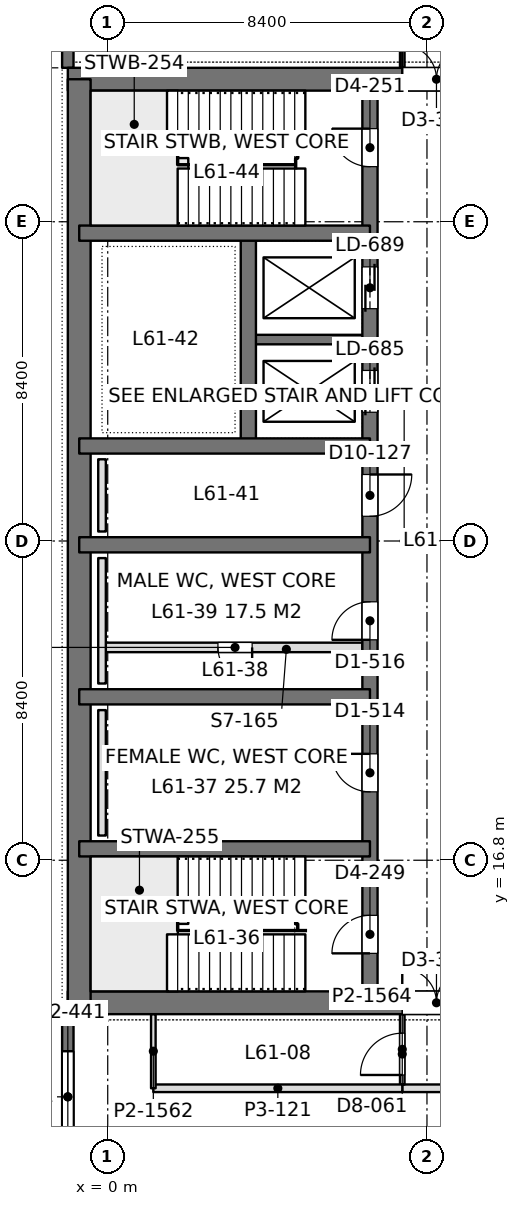
"""IFC4 building model, lengths in metres.
Left out: names, types, materials, properties, quantities, classifications, styles, units other than length and angle.
Written with IfcOpenShell. Run it as: python <this file> out.ifc"""

import sys

from ifc_helpers import new_model, si_unit, direction, frame, frame_2d, origin, place, context, subcontext, project, spatial, rectangle, extrude, element, fill, save


model = new_model("IFC4")
c1 = context("Model", 3, precision=1e-05, world=origin(), true_north=direction((0.0, 1.0)))
c2 = subcontext(c1, "Body", "Model", "MODEL_VIEW")
j1 = project(units=[si_unit("LENGTHUNIT", "METRE"), si_unit("PLANEANGLEUNIT", "RADIAN")], contexts=[c1])
p1 = place(None, origin())
s1 = spatial("IfcSite", under=j1, at=p1, CompositionType="ELEMENT")
p2 = place(p1, origin())
s2 = spatial("IfcBuilding", under=s1, at=p2, CompositionType="ELEMENT")
p3 = place(p2, frame((0.0, 0.0, 268.2)))
s3 = spatial("IfcBuildingStorey", under=s2, at=p3, CompositionType="ELEMENT", Elevation=268.2)
p4 = place(p3, frame((-1.05, 13.05, 0.0), z_axis=(0.0, 0.0, 1.0), x_axis=(1.0, 0.0, 0.0)))
e1 = element("IfcWall", 1, at=p4, inside=s3, PredefinedType="SHEAR", context=c2, shape_type="SweptSolid", body=[
    extrude(rectangle(XDim=17.7, YDim=0.6, at=frame_2d((8.85, 0.0))), origin(), (0.0, 0.0, 1.0), 4.5),
])
p5 = place(p4, frame((8.8, 0.0, 0.0)))
e2 = element("IfcOpeningElement", 2, at=p5, cuts=e1, PredefinedType="OPENING", context=c2, shape_type="SweptSolid", body=[
    extrude(rectangle(XDim=1.8, YDim=2.4, at=frame_2d((0.9, 1.2))), frame((0.0, 0.31, 0.0), z_axis=(0.0, -1.0, 0.0), x_axis=(1.0, 0.0, 0.0)), (0.0, 0.0, 1.0), 0.62),
])
p6 = place(p3, frame((-1.05, 37.35, 0.0), z_axis=(0.0, 0.0, 1.0), x_axis=(1.0, 0.0, 0.0)))
e3 = element("IfcWall", 3, at=p6, inside=s3, PredefinedType="SHEAR", context=c2, shape_type="SweptSolid", body=[
    extrude(rectangle(XDim=17.7, YDim=0.6, at=frame_2d((8.85, 0.0))), origin(), (0.0, 0.0, 1.0), 4.5),
])
p7 = place(p6, frame((8.8, 0.0, 0.0)))
e4 = element("IfcOpeningElement", 4, at=p7, cuts=e3, PredefinedType="OPENING", context=c2, shape_type="SweptSolid", body=[
    extrude(rectangle(XDim=1.8, YDim=2.4, at=frame_2d((0.9, 1.2))), frame((0.0, 0.31, 0.0), z_axis=(0.0, -1.0, 0.0), x_axis=(1.0, 0.0, 0.0)), (0.0, 0.0, 1.0), 0.62),
])
p8 = place(p3, frame((-0.75, 13.05, 0.0), z_axis=(0.0, 0.0, 1.0), x_axis=(0.0, 1.0, 0.0)))
e5 = element("IfcWall", 5, at=p8, inside=s3, PredefinedType="SHEAR", context=c2, shape_type="SweptSolid", body=[
    extrude(rectangle(XDim=24.3, YDim=0.6, at=frame_2d((12.15, 0.0))), origin(), (0.0, 0.0, 1.0), 4.5),
])
p9 = place(p3, frame((6.9, 13.05, 0.0), z_axis=(0.0, 0.0, 1.0), x_axis=(0.0, 1.0, 0.0)))
e6 = element("IfcWall", 6, at=p9, inside=s3, PredefinedType="SHEAR", context=c2, shape_type="SweptSolid", body=[
    extrude(rectangle(XDim=24.3, YDim=0.4, at=frame_2d((12.15, 0.0))), origin(), (0.0, 0.0, 1.0), 4.5),
])
p10 = place(p9, frame((1.3, 0.0, 0.0)))
e7 = element("IfcOpeningElement", 7, at=p10, cuts=e6, PredefinedType="OPENING", context=c2, shape_type="SweptSolid", body=[
    extrude(rectangle(XDim=1.0, YDim=2.2, at=frame_2d((0.5, 1.1))), frame((0.0, 0.21, 0.0), z_axis=(0.0, -1.0, 0.0), x_axis=(1.0, 0.0, 0.0)), (0.0, 0.0, 1.0), 0.42),
])
p11 = place(p9, frame((22.0, 0.0, 0.0)))
e8 = element("IfcOpeningElement", 8, at=p11, cuts=e6, PredefinedType="OPENING", context=c2, shape_type="SweptSolid", body=[
    extrude(rectangle(XDim=1.0, YDim=2.2, at=frame_2d((0.5, 1.1))), frame((0.0, 0.21, 0.0), z_axis=(0.0, -1.0, 0.0), x_axis=(1.0, 0.0, 0.0)), (0.0, 0.0, 1.0), 0.42),
])
p12 = place(p9, frame((5.55, 0.0, 0.0)))
e9 = element("IfcOpeningElement", 9, at=p12, cuts=e6, PredefinedType="OPENING", context=c2, shape_type="SweptSolid", body=[
    extrude(rectangle(XDim=1.0, YDim=2.2, at=frame_2d((0.5, 1.1))), frame((0.0, 0.21, 0.0), z_axis=(0.0, -1.0, 0.0), x_axis=(1.0, 0.0, 0.0)), (0.0, 0.0, 1.0), 0.42),
])
p13 = place(p9, frame((9.55, 0.0, 0.0)))
e10 = element("IfcOpeningElement", 10, at=p13, cuts=e6, PredefinedType="OPENING", context=c2, shape_type="SweptSolid", body=[
    extrude(rectangle(XDim=1.0, YDim=2.2, at=frame_2d((0.5, 1.1))), frame((0.0, 0.21, 0.0), z_axis=(0.0, -1.0, 0.0), x_axis=(1.0, 0.0, 0.0)), (0.0, 0.0, 1.0), 0.42),
])
p14 = place(p9, frame((12.8, 0.0, 0.0)))
e11 = element("IfcOpeningElement", 11, at=p14, cuts=e6, PredefinedType="OPENING", context=c2, shape_type="SweptSolid", body=[
    extrude(rectangle(XDim=1.1, YDim=2.2, at=frame_2d((0.55, 1.1))), frame((0.0, 0.21, 0.0), z_axis=(0.0, -1.0, 0.0), x_axis=(1.0, 0.0, 0.0)), (0.0, 0.0, 1.0), 0.42),
])
p15 = place(p9, frame((15.538, 0.0, 0.0)))
e12 = element("IfcOpeningElement", 12, at=p15, cuts=e6, PredefinedType="OPENING", context=c2, shape_type="SweptSolid", body=[
    extrude(rectangle(XDim=1.1, YDim=2.2, at=frame_2d((0.55, 1.1))), frame((0.0, 0.21, 0.0), z_axis=(0.0, -1.0, 0.0), x_axis=(1.0, 0.0, 0.0)), (0.0, 0.0, 1.0), 0.42),
])
p16 = place(p9, frame((18.262, 0.0, 0.0)))
e13 = element("IfcOpeningElement", 13, at=p16, cuts=e6, PredefinedType="OPENING", context=c2, shape_type="SweptSolid", body=[
    extrude(rectangle(XDim=1.1, YDim=2.2, at=frame_2d((0.55, 1.1))), frame((0.0, 0.21, 0.0), z_axis=(0.0, -1.0, 0.0), x_axis=(1.0, 0.0, 0.0)), (0.0, 0.0, 1.0), 0.42),
])
for number, where, z_axis, x_axis in (
    (14, (-0.75, 17.1, 0.0), (0.0, 0.0, 1.0), (1.0, 0.0, 0.0)),
    (15, (-0.75, 21.1, 0.0), (0.0, 0.0, 1.0), (1.0, 0.0, 0.0)),
    (16, (-0.75, 25.1, 0.0), (0.0, 0.0, 1.0), (1.0, 0.0, 0.0)),
    (17, (-0.75, 27.7, 0.0), (0.0, 0.0, 1.0), (1.0, 0.0, 0.0)),
    (18, (-0.75, 33.3, 0.0), (0.0, 0.0, 1.0), (1.0, 0.0, 0.0)),
):
    element("IfcWall", number, at=place(p3, frame(where, z_axis=z_axis, x_axis=x_axis)), inside=s3, PredefinedType="SHEAR", context=c2, shape_type="SweptSolid", body=[
        extrude(rectangle(XDim=7.65, YDim=0.4, at=frame_2d((3.825, 0.0))), origin(), (0.0, 0.0, 1.0), 4.5),
    ])
p17 = place(p3, frame((3.7, 27.7, 0.0), z_axis=(0.0, 0.0, 1.0), x_axis=(0.0, 1.0, 0.0)))
e19 = element("IfcWall", 19, at=p17, inside=s3, PredefinedType="SHEAR", context=c2, shape_type="SweptSolid", body=[
    extrude(rectangle(XDim=5.6, YDim=0.4, at=frame_2d((2.8, 0.0))), origin(), (0.0, 0.0, 1.0), 4.5),
])
p18 = place(p3, frame((3.7, 30.5, 0.0), z_axis=(0.0, 0.0, 1.0), x_axis=(1.0, 0.0, 0.0)))
e20 = element("IfcWall", 20, at=p18, inside=s3, PredefinedType="SHEAR", context=c2, shape_type="SweptSolid", body=[
    extrude(rectangle(XDim=3.2, YDim=0.25, at=frame_2d((1.6, 0.0))), origin(), (0.0, 0.0, 1.0), 4.5),
])
p19 = place(p3, frame((-1.05, 8.4, 0.0), z_axis=(0.0, 0.0, 1.0), x_axis=(0.0, 1.0, 0.0)))
e21 = element("IfcWall", 21, at=p19, inside=s3, PredefinedType="SOLIDWALL", context=c2, shape_type="SweptSolid", body=[
    extrude(rectangle(XDim=4.35, YDim=0.3, at=frame_2d((2.175, 0.0))), origin(), (0.0, 0.0, 1.0), 4.35),
])
p20 = place(p19, frame((0.975, 0.0, 0.9)))
e22 = element("IfcOpeningElement", 22, at=p20, cuts=e21, PredefinedType="OPENING", context=c2, shape_type="SweptSolid", body=[
    extrude(rectangle(XDim=2.4, YDim=1.9, at=frame_2d((1.2, 0.95))), frame((0.0, 0.16, 0.0), z_axis=(0.0, -1.0, 0.0), x_axis=(1.0, 0.0, 0.0)), (0.0, 0.0, 1.0), 0.32),
])
p21 = place(p3, frame((-1.05, 37.65, 0.0), z_axis=(0.0, 0.0, 1.0), x_axis=(0.0, 1.0, 0.0)))
e23 = element("IfcWall", 23, at=p21, inside=s3, PredefinedType="SOLIDWALL", context=c2, shape_type="SweptSolid", body=[
    extrude(rectangle(XDim=4.35, YDim=0.3, at=frame_2d((2.175, 0.0))), origin(), (0.0, 0.0, 1.0), 4.35),
])
p22 = place(p21, frame((0.975, 0.0, 0.9)))
e24 = element("IfcOpeningElement", 24, at=p22, cuts=e23, PredefinedType="OPENING", context=c2, shape_type="SweptSolid", body=[
    extrude(rectangle(XDim=2.4, YDim=1.9, at=frame_2d((1.2, 0.95))), frame((0.0, 0.16, 0.0), z_axis=(0.0, -1.0, 0.0), x_axis=(1.0, 0.0, 0.0)), (0.0, 0.0, 1.0), 0.32),
])
p23 = place(p3, frame((7.748, 10.8, 0.0), z_axis=(0.0, 0.0, 1.0), x_axis=(1.0, 0.0, 0.0)))
e25 = element("IfcWall", 25, at=p23, inside=s3, PredefinedType="PARTITIONING", context=c2, shape_type="SweptSolid", body=[
    extrude(rectangle(XDim=41.452, YDim=0.2, at=frame_2d((20.726, 0.0))), origin(), (0.0, 0.0, 1.0), 3.8),
])
p24 = place(p23, frame((1.527, 0.0, 0.0)))
e26 = element("IfcOpeningElement", 26, at=p24, cuts=e25, PredefinedType="OPENING", context=c2, shape_type="SweptSolid", body=[
    extrude(rectangle(XDim=1.8, YDim=2.2, at=frame_2d((0.9, 1.1))), frame((0.0, 0.11, 0.0), z_axis=(0.0, -1.0, 0.0), x_axis=(1.0, 0.0, 0.0)), (0.0, 0.0, 1.0), 0.22),
])
p25 = place(p23, frame((8.152, 0.0, 0.0)))
e27 = element("IfcOpeningElement", 27, at=p25, cuts=e25, PredefinedType="OPENING", context=c2, shape_type="SweptSolid", body=[
    extrude(rectangle(XDim=1.8, YDim=2.2, at=frame_2d((0.9, 1.1))), frame((0.0, 0.11, 0.0), z_axis=(0.0, -1.0, 0.0), x_axis=(1.0, 0.0, 0.0)), (0.0, 0.0, 1.0), 0.22),
])
p26 = place(p23, frame((12.352, 0.0, 0.0)))
e28 = element("IfcOpeningElement", 28, at=p26, cuts=e25, PredefinedType="OPENING", context=c2, shape_type="SweptSolid", body=[
    extrude(rectangle(XDim=1.8, YDim=2.2, at=frame_2d((0.9, 1.1))), frame((0.0, 0.11, 0.0), z_axis=(0.0, -1.0, 0.0), x_axis=(1.0, 0.0, 0.0)), (0.0, 0.0, 1.0), 0.22),
])
p27 = place(p23, frame((20.752, 0.0, 0.0)))
e29 = element("IfcOpeningElement", 29, at=p27, cuts=e25, PredefinedType="OPENING", context=c2, shape_type="SweptSolid", body=[
    extrude(rectangle(XDim=1.8, YDim=2.2, at=frame_2d((0.9, 1.1))), frame((0.0, 0.11, 0.0), z_axis=(0.0, -1.0, 0.0), x_axis=(1.0, 0.0, 0.0)), (0.0, 0.0, 1.0), 0.22),
])
p28 = place(p23, frame((24.952, 0.0, 0.0)))
e30 = element("IfcOpeningElement", 30, at=p28, cuts=e25, PredefinedType="OPENING", context=c2, shape_type="SweptSolid", body=[
    extrude(rectangle(XDim=1.8, YDim=2.2, at=frame_2d((0.9, 1.1))), frame((0.0, 0.11, 0.0), z_axis=(0.0, -1.0, 0.0), x_axis=(1.0, 0.0, 0.0)), (0.0, 0.0, 1.0), 0.22),
])
p29 = place(p23, frame((32.952, 0.0, 0.0)))
e31 = element("IfcOpeningElement", 31, at=p29, cuts=e25, PredefinedType="OPENING", context=c2, shape_type="SweptSolid", body=[
    extrude(rectangle(XDim=1.8, YDim=2.2, at=frame_2d((0.9, 1.1))), frame((0.0, 0.11, 0.0), z_axis=(0.0, -1.0, 0.0), x_axis=(1.0, 0.0, 0.0)), (0.0, 0.0, 1.0), 0.22),
])
p30 = place(p23, frame((36.752, 0.0, 0.0)))
e32 = element("IfcOpeningElement", 32, at=p30, cuts=e25, PredefinedType="OPENING", context=c2, shape_type="SweptSolid", body=[
    extrude(rectangle(XDim=1.8, YDim=2.2, at=frame_2d((0.9, 1.1))), frame((0.0, 0.11, 0.0), z_axis=(0.0, -1.0, 0.0), x_axis=(1.0, 0.0, 0.0)), (0.0, 0.0, 1.0), 0.22),
])
p31 = place(p3, frame((7.75, 10.898, 0.0), z_axis=(0.0, 0.0, 1.0), x_axis=(0.0, 1.0, 0.0)))
e33 = element("IfcWall", 33, at=p31, inside=s3, PredefinedType="PARTITIONING", context=c2, shape_type="SweptSolid", body=[
    extrude(rectangle(XDim=1.854, YDim=0.12, at=frame_2d((0.927, 0.0))), origin(), (0.0, 0.0, 1.0), 4.35),
])
p32 = place(p31, frame((0.252, 0.0, 0.0)))
e34 = element("IfcOpeningElement", 34, at=p32, cuts=e33, PredefinedType="OPENING", context=c2, shape_type="SweptSolid", body=[
    extrude(rectangle(XDim=1.1, YDim=2.4, at=frame_2d((0.55, 1.2))), frame((0.0, 0.07, 0.0), z_axis=(0.0, -1.0, 0.0), x_axis=(1.0, 0.0, 0.0)), (0.0, 0.0, 1.0), 0.14),
])
p33 = place(p3, frame((1.2, 10.8, 0.0), z_axis=(0.0, 0.0, 1.0), x_axis=(1.0, 0.0, 0.0)))
e35 = element("IfcWall", 35, at=p33, inside=s3, PredefinedType="PARTITIONING", context=c2, shape_type="SweptSolid", body=[
    extrude(rectangle(XDim=6.552, YDim=0.2, at=frame_2d((3.276, 0.0))), origin(), (0.0, 0.0, 1.0), 4.35),
])
p34 = place(p3, frame((1.2, 10.8, 0.0), z_axis=(0.0, 0.0, 1.0), x_axis=(0.0, 1.0, 0.0)))
e36 = element("IfcWall", 36, at=p34, inside=s3, PredefinedType="PARTITIONING", context=c2, shape_type="SweptSolid", body=[
    extrude(rectangle(XDim=1.952, YDim=0.12, at=frame_2d((0.976, 0.0))), origin(), (0.0, 0.0, 1.0), 4.35),
])
p35 = place(p3, frame((7.75, 37.648, 0.0), z_axis=(0.0, 0.0, 1.0), x_axis=(0.0, 1.0, 0.0)))
e37 = element("IfcWall", 37, at=p35, inside=s3, PredefinedType="PARTITIONING", context=c2, shape_type="SweptSolid", body=[
    extrude(rectangle(XDim=1.854, YDim=0.12, at=frame_2d((0.927, 0.0))), origin(), (0.0, 0.0, 1.0), 4.35),
])
p36 = place(p35, frame((0.502, 0.0, 0.0)))
e38 = element("IfcOpeningElement", 38, at=p36, cuts=e37, PredefinedType="OPENING", context=c2, shape_type="SweptSolid", body=[
    extrude(rectangle(XDim=1.1, YDim=2.4, at=frame_2d((0.55, 1.2))), frame((0.0, 0.07, 0.0), z_axis=(0.0, -1.0, 0.0), x_axis=(1.0, 0.0, 0.0)), (0.0, 0.0, 1.0), 0.14),
])
p37 = place(p3, frame((1.2, 37.648, 0.0), z_axis=(0.0, 0.0, 1.0), x_axis=(0.0, 1.0, 0.0)))
e39 = element("IfcWall", 39, at=p37, inside=s3, PredefinedType="PARTITIONING", context=c2, shape_type="SweptSolid", body=[
    extrude(rectangle(XDim=1.952, YDim=0.12, at=frame_2d((0.976, 0.0))), origin(), (0.0, 0.0, 1.0), 4.35),
])
p38 = place(p3, frame((-0.05, 22.4, 0.0), z_axis=(0.0, 0.0, 1.0), x_axis=(1.0, 0.0, 0.0)))
e40 = element("IfcWall", 40, at=p38, inside=s3, PredefinedType="PARTITIONING", context=c2, shape_type="SweptSolid", body=[
    extrude(rectangle(XDim=6.75, YDim=0.25, at=frame_2d((3.375, 0.0))), origin(), (0.0, 0.0, 1.0), 4.3),
])
p39 = place(p38, frame((2.95, 0.0, 0.0)))
e41 = element("IfcOpeningElement", 41, at=p39, cuts=e40, PredefinedType="OPENING", context=c2, shape_type="SweptSolid", body=[
    extrude(rectangle(XDim=0.9, YDim=2.2, at=frame_2d((0.45, 1.1))), frame((0.0, 0.135, 0.0), z_axis=(0.0, -1.0, 0.0), x_axis=(1.0, 0.0, 0.0)), (0.0, 0.0, 1.0), 0.27),
])
for number, where, z_axis, x_axis in (
    (42, (-0.15, 17.45, 0.0), (0.0, 0.0, 1.0), (0.0, 1.0, 0.0)),
    (43, (-0.15, 21.45, 0.0), (0.0, 0.0, 1.0), (0.0, 1.0, 0.0)),
):
    element("IfcWall", number, at=place(p3, frame(where, z_axis=z_axis, x_axis=x_axis)), inside=s3, PredefinedType="PLUMBINGWALL", context=c2, shape_type="SweptSolid", body=[
        extrude(rectangle(XDim=3.3, YDim=0.2, at=frame_2d((1.65, 0.0))), origin(), (0.0, 0.0, 1.0), 1.2),
    ])
p40 = place(p3, frame((-0.15, 25.45, 0.0), z_axis=(0.0, 0.0, 1.0), x_axis=(0.0, 1.0, 0.0)))
e44 = element("IfcWall", 44, at=p40, inside=s3, PredefinedType="PLUMBINGWALL", context=c2, shape_type="SweptSolid", body=[
    extrude(rectangle(XDim=1.9, YDim=0.2, at=frame_2d((0.95, 0.0))), origin(), (0.0, 0.0, 1.0), 1.2),
])
p41 = place(p20, origin())
e45 = element("IfcWindow", 45, at=p41, inside=s3, PartitioningType="SINGLE_PANEL", PredefinedType="WINDOW", context=c2, shape_type="SweptSolid", body=[
    extrude(rectangle(XDim=2.4, YDim=1.9, at=frame_2d((1.2, 0.95))), frame((0.0, 0.03, 0.0), z_axis=(0.0, -1.0, 0.0), x_axis=(1.0, 0.0, 0.0)), (0.0, 0.0, 1.0), 0.06),
])
fill(e22, e45)
p42 = place(p5, origin())
e46 = element("IfcDoor", 46, at=p42, inside=s3, OperationType="DOUBLE_DOOR_SINGLE_SWING", PredefinedType="DOOR", context=c2, shape_type="SweptSolid", body=[
    extrude(rectangle(XDim=1.8, YDim=2.4, at=frame_2d((0.9, 1.2))), frame((0.0, 0.025, 0.0), z_axis=(0.0, -1.0, 0.0), x_axis=(1.0, 0.0, 0.0)), (0.0, 0.0, 1.0), 0.05),
])
fill(e2, e46)
p43 = place(p7, origin())
e47 = element("IfcDoor", 47, at=p43, inside=s3, OperationType="DOUBLE_DOOR_SINGLE_SWING", PredefinedType="DOOR", context=c2, shape_type="SweptSolid", body=[
    extrude(rectangle(XDim=1.8, YDim=2.4, at=frame_2d((0.9, 1.2))), frame((0.0, 0.025, 0.0), z_axis=(0.0, -1.0, 0.0), x_axis=(1.0, 0.0, 0.0)), (0.0, 0.0, 1.0), 0.05),
])
fill(e4, e47)
p44 = place(p10, origin())
e48 = element("IfcDoor", 48, at=p44, inside=s3, OperationType="SINGLE_SWING_LEFT", PredefinedType="DOOR", context=c2, shape_type="SweptSolid", body=[
    extrude(rectangle(XDim=1.0, YDim=2.2, at=frame_2d((0.5, 1.1))), frame((0.0, 0.025, 0.0), z_axis=(0.0, -1.0, 0.0), x_axis=(1.0, 0.0, 0.0)), (0.0, 0.0, 1.0), 0.05),
])
fill(e7, e48)
p45 = place(p11, origin())
e49 = element("IfcDoor", 49, at=p45, inside=s3, OperationType="SINGLE_SWING_RIGHT", PredefinedType="DOOR", context=c2, shape_type="SweptSolid", body=[
    extrude(rectangle(XDim=1.0, YDim=2.2, at=frame_2d((0.5, 1.1))), frame((0.0, 0.025, 0.0), z_axis=(0.0, -1.0, 0.0), x_axis=(1.0, 0.0, 0.0)), (0.0, 0.0, 1.0), 0.05),
])
fill(e8, e49)
p46 = place(p12, origin())
e50 = element("IfcDoor", 50, at=p46, inside=s3, OperationType="SINGLE_SWING_RIGHT", PredefinedType="DOOR", context=c2, shape_type="SweptSolid", body=[
    extrude(rectangle(XDim=1.0, YDim=2.2, at=frame_2d((0.5, 1.1))), frame((0.0, 0.025, 0.0), z_axis=(0.0, -1.0, 0.0), x_axis=(1.0, 0.0, 0.0)), (0.0, 0.0, 1.0), 0.05),
])
fill(e9, e50)
p47 = place(p13, origin())
e51 = element("IfcDoor", 51, at=p47, inside=s3, OperationType="SINGLE_SWING_LEFT", PredefinedType="DOOR", context=c2, shape_type="SweptSolid", body=[
    extrude(rectangle(XDim=1.0, YDim=2.2, at=frame_2d((0.5, 1.1))), frame((0.0, 0.025, 0.0), z_axis=(0.0, -1.0, 0.0), x_axis=(1.0, 0.0, 0.0)), (0.0, 0.0, 1.0), 0.05),
])
fill(e10, e51)
p48 = place(p14, frame((1.1, 0.0, 0.0), z_axis=(0.0, 0.0, 1.0), x_axis=(-1.0, 0.0, 0.0)))
e52 = element("IfcDoor", 52, at=p48, inside=s3, OperationType="SINGLE_SWING_LEFT", PredefinedType="DOOR", context=c2, shape_type="SweptSolid", body=[
    extrude(rectangle(XDim=1.1, YDim=2.2, at=frame_2d((0.55, 1.1))), frame((0.0, 0.025, 0.0), z_axis=(0.0, -1.0, 0.0), x_axis=(1.0, 0.0, 0.0)), (0.0, 0.0, 1.0), 0.05),
])
fill(e11, e52)
p49 = place(p15, origin())
e53 = element("IfcDoor", 53, at=p49, inside=s3, OperationType="DOUBLE_DOOR_SLIDING", PredefinedType="DOOR", context=c2, shape_type="SweptSolid", body=[
    extrude(rectangle(XDim=1.1, YDim=2.2, at=frame_2d((0.55, 1.1))), frame((0.0, 0.025, 0.0), z_axis=(0.0, -1.0, 0.0), x_axis=(1.0, 0.0, 0.0)), (0.0, 0.0, 1.0), 0.05),
])
fill(e12, e53)
p50 = place(p16, origin())
e54 = element("IfcDoor", 54, at=p50, inside=s3, OperationType="DOUBLE_DOOR_SLIDING", PredefinedType="DOOR", context=c2, shape_type="SweptSolid", body=[
    extrude(rectangle(XDim=1.1, YDim=2.2, at=frame_2d((0.55, 1.1))), frame((0.0, 0.025, 0.0), z_axis=(0.0, -1.0, 0.0), x_axis=(1.0, 0.0, 0.0)), (0.0, 0.0, 1.0), 0.05),
])
fill(e13, e54)
p51 = place(p32, origin())
e55 = element("IfcDoor", 55, at=p51, inside=s3, OperationType="SINGLE_SWING_LEFT", PredefinedType="DOOR", context=c2, shape_type="SweptSolid", body=[
    extrude(rectangle(XDim=1.1, YDim=2.4, at=frame_2d((0.55, 1.2))), frame((0.0, 0.025, 0.0), z_axis=(0.0, -1.0, 0.0), x_axis=(1.0, 0.0, 0.0)), (0.0, 0.0, 1.0), 0.05),
])
fill(e34, e55)
p52 = place(p39, frame((0.9, 0.0, 0.0), z_axis=(0.0, 0.0, 1.0), x_axis=(-1.0, 0.0, 0.0)))
e56 = element("IfcDoor", 56, at=p52, inside=s3, OperationType="SINGLE_SWING_LEFT", PredefinedType="DOOR", context=c2, shape_type="SweptSolid", body=[
    extrude(rectangle(XDim=0.9, YDim=2.2, at=frame_2d((0.45, 1.1))), frame((0.0, 0.025, 0.0), z_axis=(0.0, -1.0, 0.0), x_axis=(1.0, 0.0, 0.0)), (0.0, 0.0, 1.0), 0.05),
])
fill(e41, e56)
save(model, sys.argv[1])
